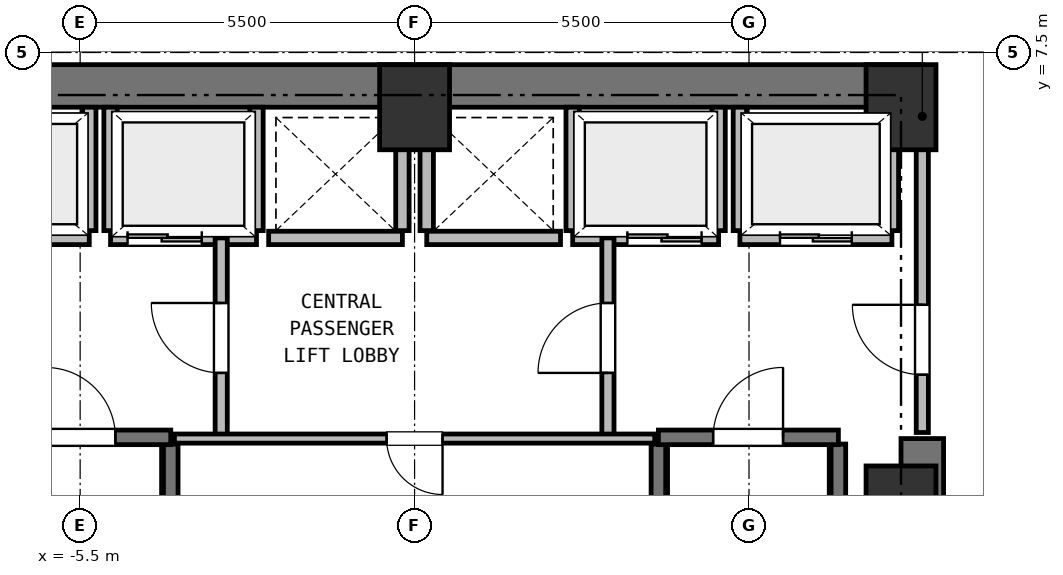
"""IFC4 building model, lengths in metres.
Left out: names, types, materials, properties, quantities, classifications, styles, units other than length and angle.
Written with IfcOpenShell. Run it as: python <this file> out.ifc"""

import sys

from ifc_helpers import new_model, si_unit, direction, frame, frame_2d, origin, origin_2d, place, context, subcontext, project, spatial, rectangle, extrude, element, fill, save


model = new_model("IFC4")
c1 = context("Model", 3, precision=1e-05, world=origin(), true_north=direction((0.0, 1.0)))
c2 = subcontext(c1, "Body", "Model", "MODEL_VIEW")
j1 = project(units=[si_unit("LENGTHUNIT", "METRE"), si_unit("PLANEANGLEUNIT", "RADIAN")], contexts=[c1])
p1 = place(None, origin())
s1 = spatial("IfcSite", under=j1, at=p1, CompositionType="ELEMENT")
p2 = place(p1, origin())
s2 = spatial("IfcBuilding", under=s1, at=p2, CompositionType="ELEMENT")
p3 = place(p2, frame((0.0, 0.0, 6.0)))
s3 = spatial("IfcBuildingStorey", under=s2, at=p3, CompositionType="ELEMENT", Elevation=6.0)
for number, where, z_axis, x_axis in (
    (1, (8.0, 0.0, 0.0), (0.0, 0.0, 1.0), (1.0, 0.0, 0.0)),
    (2, (8.0, 6.6, 0.0), (0.0, 0.0, 1.0), (1.0, 0.0, 0.0)),
    (3, (0.0, 6.6, 0.0), (0.0, 0.0, 1.0), (1.0, 0.0, 0.0)),
):
    element("IfcColumn", number, at=place(p3, frame(where, z_axis=z_axis, x_axis=x_axis)), inside=s3, PredefinedType="COLUMN", context=c2, shape_type="SweptSolid", body=[
        extrude(rectangle(XDim=1.15, YDim=1.4, at=origin_2d()), origin(), (0.0, 0.0, 1.0), 5.0),
    ])
p4 = place(p3, frame((-8.35, 6.95, 0.0), z_axis=(0.0, 0.0, 1.0), x_axis=(1.0, 0.0, 0.0)))
e4 = element("IfcWall", 4, at=p4, inside=s3, PredefinedType="SHEAR", context=c2, shape_type="SweptSolid", body=[
    extrude(rectangle(XDim=16.7, YDim=0.7, at=frame_2d((8.35, 0.0))), origin(), (0.0, 0.0, 1.0), 4.72),
])
p5 = place(p3, frame((8.35, -6.95, 0.0), z_axis=(0.0, 0.0, 1.0), x_axis=(0.0, 1.0, 0.0)))
e5 = element("IfcWall", 5, at=p5, inside=s3, PredefinedType="SHEAR", context=c2, shape_type="SweptSolid", body=[
    extrude(rectangle(XDim=8.1, YDim=0.7, at=frame_2d((4.05, 0.0))), origin(), (0.0, 0.0, 1.0), 4.72),
])
p6 = place(p3, frame((-4.01, -6.16, 0.0), z_axis=(0.0, 0.0, 1.0), x_axis=(0.0, 1.0, 0.0)))
e6 = element("IfcWall", 6, at=p6, inside=s3, PredefinedType="SHEAR", context=c2, shape_type="SweptSolid", body=[
    extrude(rectangle(XDim=7.22, YDim=0.24, at=frame_2d((3.61, 0.0))), origin(), (0.0, 0.0, 1.0), 4.72),
])
p7 = place(p3, frame((-6.97, 1.17, 0.0), z_axis=(0.0, 0.0, 1.0), x_axis=(1.0, 0.0, 0.0)))
e7 = element("IfcWall", 7, at=p7, inside=s3, PredefinedType="SHEAR", context=c2, shape_type="SweptSolid", body=[
    extrude(rectangle(XDim=2.96, YDim=0.24, at=frame_2d((1.48, 0.0))), origin(), (0.0, 0.0, 1.0), 4.72),
])
p8 = place(p7, frame((0.9, 0.0, 0.0)))
e8 = element("IfcOpeningElement", 8, at=p8, cuts=e7, PredefinedType="OPENING", context=c2, shape_type="SweptSolid", body=[
    extrude(rectangle(XDim=1.15, YDim=2.15, at=frame_2d((0.575, 1.075))), frame((0.0, 0.13, 0.0), z_axis=(0.0, -1.0, 0.0), x_axis=(1.0, 0.0, 0.0)), (0.0, 0.0, 1.0), 0.26),
])
for number, where, z_axis, x_axis in (
    (9, (4.01, -6.16, 0.0), (0.0, 0.0, 1.0), (0.0, 1.0, 0.0)),
    (10, (6.97, -6.16, 0.0), (0.0, 0.0, 1.0), (0.0, 1.0, 0.0)),
):
    element("IfcWall", number, at=place(p3, frame(where, z_axis=z_axis, x_axis=x_axis)), inside=s3, PredefinedType="SHEAR", context=c2, shape_type="SweptSolid", body=[
        extrude(rectangle(XDim=7.22, YDim=0.24, at=frame_2d((3.61, 0.0))), origin(), (0.0, 0.0, 1.0), 4.72),
    ])
p9 = place(p3, frame((4.01, 1.17, 0.0), z_axis=(0.0, 0.0, 1.0), x_axis=(1.0, 0.0, 0.0)))
e11 = element("IfcWall", 11, at=p9, inside=s3, PredefinedType="SHEAR", context=c2, shape_type="SweptSolid", body=[
    extrude(rectangle(XDim=2.96, YDim=0.24, at=frame_2d((1.48, 0.0))), origin(), (0.0, 0.0, 1.0), 4.72),
])
p10 = place(p9, frame((0.9, 0.0, 0.0)))
e12 = element("IfcOpeningElement", 12, at=p10, cuts=e11, PredefinedType="OPENING", context=c2, shape_type="SweptSolid", body=[
    extrude(rectangle(XDim=1.15, YDim=2.15, at=frame_2d((0.575, 1.075))), frame((0.0, 0.13, 0.0), z_axis=(0.0, -1.0, 0.0), x_axis=(1.0, 0.0, 0.0)), (0.0, 0.0, 1.0), 0.26),
])
p11 = place(p3, frame((-7.85, 4.45, 0.0), z_axis=(0.0, 0.0, 1.0), x_axis=(1.0, 0.0, 0.0)))
e13 = element("IfcWall", 13, at=p11, inside=s3, PredefinedType="PARTITIONING", context=c2, shape_type="SweptSolid", body=[
    extrude(rectangle(XDim=2.5, YDim=0.22, at=frame_2d((1.25, 0.0))), origin(), (0.0, 0.0, 1.0), 4.72),
])
p12 = place(p11, frame((0.66, 0.0, 0.0)))
e14 = element("IfcOpeningElement", 14, at=p12, cuts=e13, PredefinedType="OPENING", context=c2, shape_type="SweptSolid", body=[
    extrude(rectangle(XDim=1.18, YDim=2.15, at=frame_2d((0.59, 1.075))), frame((0.0, 0.12, 0.0), z_axis=(0.0, -1.0, 0.0), x_axis=(1.0, 0.0, 0.0)), (0.0, 0.0, 1.0), 0.24),
])
p13 = place(p3, frame((-5.35, 4.57, 0.0), z_axis=(0.0, 0.0, 1.0), x_axis=(0.0, 1.0, 0.0)))
e15 = element("IfcWall", 15, at=p13, inside=s3, PredefinedType="PARTITIONING", context=c2, shape_type="SweptSolid", body=[
    extrude(rectangle(XDim=2.03, YDim=0.22, at=frame_2d((1.015, 0.0))), origin(), (0.0, 0.0, 1.0), 4.72),
])
p14 = place(p3, frame((5.35, 4.45, 0.0), z_axis=(0.0, 0.0, 1.0), x_axis=(1.0, 0.0, 0.0)))
e16 = element("IfcWall", 16, at=p14, inside=s3, PredefinedType="PARTITIONING", context=c2, shape_type="SweptSolid", body=[
    extrude(rectangle(XDim=2.5, YDim=0.22, at=frame_2d((1.25, 0.0))), origin(), (0.0, 0.0, 1.0), 4.72),
])
p15 = place(p14, frame((0.66, 0.0, 0.0)))
e17 = element("IfcOpeningElement", 17, at=p15, cuts=e16, PredefinedType="OPENING", context=c2, shape_type="SweptSolid", body=[
    extrude(rectangle(XDim=1.18, YDim=2.15, at=frame_2d((0.59, 1.075))), frame((0.0, 0.12, 0.0), z_axis=(0.0, -1.0, 0.0), x_axis=(1.0, 0.0, 0.0)), (0.0, 0.0, 1.0), 0.24),
])
p16 = place(p3, frame((5.35, 4.57, 0.0), z_axis=(0.0, 0.0, 1.0), x_axis=(0.0, 1.0, 0.0)))
e18 = element("IfcWall", 18, at=p16, inside=s3, PredefinedType="PARTITIONING", context=c2, shape_type="SweptSolid", body=[
    extrude(rectangle(XDim=2.03, YDim=0.22, at=frame_2d((1.015, 0.0))), origin(), (0.0, 0.0, 1.0), 4.72),
])
p17 = place(p3, frame((7.85, 4.57, 0.0), z_axis=(0.0, 0.0, 1.0), x_axis=(0.0, 1.0, 0.0)))
e19 = element("IfcWall", 19, at=p17, inside=s3, PredefinedType="PARTITIONING", context=c2, shape_type="SweptSolid", body=[
    extrude(rectangle(XDim=2.03, YDim=0.22, at=frame_2d((1.015, 0.0))), origin(), (0.0, 0.0, 1.0), 4.3),
])
p18 = place(p3, frame((-5.0, 4.45, 0.0), z_axis=(0.0, 0.0, 1.0), x_axis=(1.0, 0.0, 0.0)))
e20 = element("IfcWall", 20, at=p18, inside=s3, PredefinedType="PARTITIONING", context=c2, shape_type="SweptSolid", body=[
    extrude(rectangle(XDim=2.4, YDim=0.22, at=frame_2d((1.2, 0.0))), origin(), (0.0, 0.0, 1.0), 4.72),
])
p19 = place(p18, frame((0.28, 0.0, 0.0)))
e21 = element("IfcOpeningElement", 21, at=p19, cuts=e20, PredefinedType="OPENING", context=c2, shape_type="SweptSolid", body=[
    extrude(rectangle(XDim=1.22, YDim=2.15, at=frame_2d((0.61, 1.075))), frame((0.0, 0.12, 0.0), z_axis=(0.0, -1.0, 0.0), x_axis=(1.0, 0.0, 0.0)), (0.0, 0.0, 1.0), 0.24),
])
for number, where, z_axis, x_axis in (
    (22, (-5.0, 4.57, 0.0), (0.0, 0.0, 1.0), (0.0, 1.0, 0.0)),
    (23, (-2.6, 4.57, 0.0), (0.0, 0.0, 1.0), (0.0, 1.0, 0.0)),
):
    element("IfcWall", number, at=place(p3, frame(where, z_axis=z_axis, x_axis=x_axis)), inside=s3, PredefinedType="PARTITIONING", context=c2, shape_type="SweptSolid", body=[
        extrude(rectangle(XDim=2.03, YDim=0.22, at=frame_2d((1.015, 0.0))), origin(), (0.0, 0.0, 1.0), 4.72),
    ])
p20 = place(p3, frame((2.6, 4.45, 0.0), z_axis=(0.0, 0.0, 1.0), x_axis=(1.0, 0.0, 0.0)))
e24 = element("IfcWall", 24, at=p20, inside=s3, PredefinedType="PARTITIONING", context=c2, shape_type="SweptSolid", body=[
    extrude(rectangle(XDim=2.4, YDim=0.22, at=frame_2d((1.2, 0.0))), origin(), (0.0, 0.0, 1.0), 4.72),
])
p21 = place(p20, frame((0.9, 0.0, 0.0)))
e25 = element("IfcOpeningElement", 25, at=p21, cuts=e24, PredefinedType="OPENING", context=c2, shape_type="SweptSolid", body=[
    extrude(rectangle(XDim=1.22, YDim=2.15, at=frame_2d((0.61, 1.075))), frame((0.0, 0.12, 0.0), z_axis=(0.0, -1.0, 0.0), x_axis=(1.0, 0.0, 0.0)), (0.0, 0.0, 1.0), 0.24),
])
for number, where, z_axis, x_axis in (
    (26, (2.6, 4.57, 0.0), (0.0, 0.0, 1.0), (0.0, 1.0, 0.0)),
    (27, (5.0, 4.57, 0.0), (0.0, 0.0, 1.0), (0.0, 1.0, 0.0)),
):
    element("IfcWall", number, at=place(p3, frame(where, z_axis=z_axis, x_axis=x_axis)), inside=s3, PredefinedType="PARTITIONING", context=c2, shape_type="SweptSolid", body=[
        extrude(rectangle(XDim=2.03, YDim=0.22, at=frame_2d((1.015, 0.0))), origin(), (0.0, 0.0, 1.0), 4.72),
    ])
p22 = place(p3, frame((-2.4, 4.45, 0.0), z_axis=(0.0, 0.0, 1.0), x_axis=(1.0, 0.0, 0.0)))
e28 = element("IfcWall", 28, at=p22, inside=s3, PredefinedType="PARTITIONING", context=c2, shape_type="SweptSolid", body=[
    extrude(rectangle(XDim=2.2, YDim=0.22, at=frame_2d((1.1, 0.0))), origin(), (0.0, 0.0, 1.0), 4.72),
])
p23 = place(p3, frame((-0.2, 4.57, 0.0), z_axis=(0.0, 0.0, 1.0), x_axis=(0.0, 1.0, 0.0)))
e29 = element("IfcWall", 29, at=p23, inside=s3, PredefinedType="PARTITIONING", context=c2, shape_type="SweptSolid", body=[
    extrude(rectangle(XDim=2.03, YDim=0.22, at=frame_2d((1.015, 0.0))), origin(), (0.0, 0.0, 1.0), 4.72),
])
p24 = place(p3, frame((0.2, 4.45, 0.0), z_axis=(0.0, 0.0, 1.0), x_axis=(1.0, 0.0, 0.0)))
e30 = element("IfcWall", 30, at=p24, inside=s3, PredefinedType="PARTITIONING", context=c2, shape_type="SweptSolid", body=[
    extrude(rectangle(XDim=2.2, YDim=0.22, at=frame_2d((1.1, 0.0))), origin(), (0.0, 0.0, 1.0), 4.72),
])
p25 = place(p3, frame((0.2, 4.57, 0.0), z_axis=(0.0, 0.0, 1.0), x_axis=(0.0, 1.0, 0.0)))
e31 = element("IfcWall", 31, at=p25, inside=s3, PredefinedType="PARTITIONING", context=c2, shape_type="SweptSolid", body=[
    extrude(rectangle(XDim=2.03, YDim=0.22, at=frame_2d((1.015, 0.0))), origin(), (0.0, 0.0, 1.0), 4.72),
])
p26 = place(p3, frame((-3.18, 1.15, 0.0), z_axis=(0.0, 0.0, 1.0), x_axis=(0.0, 1.0, 0.0)))
e32 = element("IfcWall", 32, at=p26, inside=s3, PredefinedType="PARTITIONING", context=c2, shape_type="SweptSolid", body=[
    extrude(rectangle(XDim=3.3, YDim=0.2, at=frame_2d((1.65, 0.0))), origin(), (0.0, 0.0, 1.0), 4.72),
])
p27 = place(p26, frame((1.08, 0.0, 0.0)))
e33 = element("IfcOpeningElement", 33, at=p27, cuts=e32, PredefinedType="OPENING", context=c2, shape_type="SweptSolid", body=[
    extrude(rectangle(XDim=1.15, YDim=2.15, at=frame_2d((0.575, 1.075))), frame((0.0, 0.11, 0.0), z_axis=(0.0, -1.0, 0.0), x_axis=(1.0, 0.0, 0.0)), (0.0, 0.0, 1.0), 0.22),
])
p28 = place(p3, frame((3.18, 1.15, 0.0), z_axis=(0.0, 0.0, 1.0), x_axis=(0.0, 1.0, 0.0)))
e34 = element("IfcWall", 34, at=p28, inside=s3, PredefinedType="PARTITIONING", context=c2, shape_type="SweptSolid", body=[
    extrude(rectangle(XDim=3.3, YDim=0.2, at=frame_2d((1.65, 0.0))), origin(), (0.0, 0.0, 1.0), 4.72),
])
p29 = place(p28, frame((1.08, 0.0, 0.0)))
e35 = element("IfcOpeningElement", 35, at=p29, cuts=e34, PredefinedType="OPENING", context=c2, shape_type="SweptSolid", body=[
    extrude(rectangle(XDim=1.15, YDim=2.15, at=frame_2d((0.575, 1.075))), frame((0.0, 0.11, 0.0), z_axis=(0.0, -1.0, 0.0), x_axis=(1.0, 0.0, 0.0)), (0.0, 0.0, 1.0), 0.22),
])
p30 = place(p3, frame((8.35, 1.25, 0.0), z_axis=(0.0, 0.0, 1.0), x_axis=(0.0, 1.0, 0.0)))
e36 = element("IfcWall", 36, at=p30, inside=s3, PredefinedType="PARTITIONING", context=c2, shape_type="SweptSolid", body=[
    extrude(rectangle(XDim=5.3, YDim=0.2, at=frame_2d((2.65, 0.0))), origin(), (0.0, 0.0, 1.0), 4.72),
])
p31 = place(p30, frame((0.95, 0.0, 0.0)))
e37 = element("IfcOpeningElement", 37, at=p31, cuts=e36, PredefinedType="OPENING", context=c2, shape_type="SweptSolid", body=[
    extrude(rectangle(XDim=1.15, YDim=2.15, at=frame_2d((0.575, 1.075))), frame((0.0, 0.11, 0.0), z_axis=(0.0, -1.0, 0.0), x_axis=(1.0, 0.0, 0.0)), (0.0, 0.0, 1.0), 0.22),
])
p32 = place(p3, frame((3.95, 1.15, 0.0), z_axis=(0.0, 0.0, 1.0), x_axis=(-1.0, 0.0, 0.0)))
e38 = element("IfcWall", 38, at=p32, inside=s3, PredefinedType="PARTITIONING", context=c2, shape_type="SweptSolid", body=[
    extrude(rectangle(XDim=7.9, YDim=0.15, at=frame_2d((3.95, 0.0))), origin(), (0.0, 0.0, 1.0), 4.72),
])
p33 = place(p32, frame((3.49, 0.0, 0.0)))
e39 = element("IfcOpeningElement", 39, at=p33, cuts=e38, PredefinedType="OPENING", context=c2, shape_type="SweptSolid", body=[
    extrude(rectangle(XDim=0.92, YDim=2.05, at=frame_2d((0.46, 1.025))), frame((0.0, 0.085, 0.0), z_axis=(0.0, -1.0, 0.0), x_axis=(1.0, 0.0, 0.0)), (0.0, 0.0, 1.0), 0.17),
])
p34 = place(p8, origin())
e40 = element("IfcDoor", 40, at=p34, inside=s3, OperationType="SINGLE_SWING_LEFT", PredefinedType="DOOR", context=c2, shape_type="SweptSolid", body=[
    extrude(rectangle(XDim=1.15, YDim=2.15, at=frame_2d((0.575, 1.075))), frame((0.0, 0.025, 0.0), z_axis=(0.0, -1.0, 0.0), x_axis=(1.0, 0.0, 0.0)), (0.0, 0.0, 1.0), 0.05),
])
fill(e8, e40)
p35 = place(p10, origin())
e41 = element("IfcDoor", 41, at=p35, inside=s3, OperationType="SINGLE_SWING_RIGHT", PredefinedType="DOOR", context=c2, shape_type="SweptSolid", body=[
    extrude(rectangle(XDim=1.15, YDim=2.15, at=frame_2d((0.575, 1.075))), frame((0.0, 0.025, 0.0), z_axis=(0.0, -1.0, 0.0), x_axis=(1.0, 0.0, 0.0)), (0.0, 0.0, 1.0), 0.05),
])
fill(e12, e41)
p36 = place(p15, origin())
e42 = element("IfcDoor", 42, at=p36, inside=s3, OperationType="DOUBLE_DOOR_SLIDING", PredefinedType="DOOR", context=c2, shape_type="SweptSolid", body=[
    extrude(rectangle(XDim=1.18, YDim=2.15, at=frame_2d((0.59, 1.075))), frame((0.0, 0.025, 0.0), z_axis=(0.0, -1.0, 0.0), x_axis=(1.0, 0.0, 0.0)), (0.0, 0.0, 1.0), 0.05),
])
fill(e17, e42)
p37 = place(p19, origin())
e43 = element("IfcDoor", 43, at=p37, inside=s3, OperationType="DOUBLE_DOOR_SLIDING", PredefinedType="DOOR", context=c2, shape_type="SweptSolid", body=[
    extrude(rectangle(XDim=1.22, YDim=2.15, at=frame_2d((0.61, 1.075))), frame((0.0, 0.025, 0.0), z_axis=(0.0, -1.0, 0.0), x_axis=(1.0, 0.0, 0.0)), (0.0, 0.0, 1.0), 0.05),
])
fill(e21, e43)
p38 = place(p21, origin())
e44 = element("IfcDoor", 44, at=p38, inside=s3, OperationType="DOUBLE_DOOR_SLIDING", PredefinedType="DOOR", context=c2, shape_type="SweptSolid", body=[
    extrude(rectangle(XDim=1.22, YDim=2.15, at=frame_2d((0.61, 1.075))), frame((0.0, 0.025, 0.0), z_axis=(0.0, -1.0, 0.0), x_axis=(1.0, 0.0, 0.0)), (0.0, 0.0, 1.0), 0.05),
])
fill(e25, e44)
p39 = place(p27, origin())
e45 = element("IfcDoor", 45, at=p39, inside=s3, OperationType="SINGLE_SWING_RIGHT", PredefinedType="DOOR", context=c2, shape_type="SweptSolid", body=[
    extrude(rectangle(XDim=1.15, YDim=2.15, at=frame_2d((0.575, 1.075))), frame((0.0, 0.025, 0.0), z_axis=(0.0, -1.0, 0.0), x_axis=(1.0, 0.0, 0.0)), (0.0, 0.0, 1.0), 0.05),
])
fill(e33, e45)
p40 = place(p29, origin())
e46 = element("IfcDoor", 46, at=p40, inside=s3, OperationType="SINGLE_SWING_LEFT", PredefinedType="DOOR", context=c2, shape_type="SweptSolid", body=[
    extrude(rectangle(XDim=1.15, YDim=2.15, at=frame_2d((0.575, 1.075))), frame((0.0, 0.025, 0.0), z_axis=(0.0, -1.0, 0.0), x_axis=(1.0, 0.0, 0.0)), (0.0, 0.0, 1.0), 0.05),
])
fill(e35, e46)
p41 = place(p31, origin())
e47 = element("IfcDoor", 47, at=p41, inside=s3, OperationType="SINGLE_SWING_RIGHT", PredefinedType="DOOR", context=c2, shape_type="SweptSolid", body=[
    extrude(rectangle(XDim=1.15, YDim=2.15, at=frame_2d((0.575, 1.075))), frame((0.0, 0.025, 0.0), z_axis=(0.0, -1.0, 0.0), x_axis=(1.0, 0.0, 0.0)), (0.0, 0.0, 1.0), 0.05),
])
fill(e37, e47)
p42 = place(p33, origin())
e48 = element("IfcDoor", 48, at=p42, inside=s3, OperationType="SINGLE_SWING_LEFT", PredefinedType="DOOR", context=c2, shape_type="SweptSolid", body=[
    extrude(rectangle(XDim=0.92, YDim=2.05, at=frame_2d((0.46, 1.025))), frame((0.0, 0.025, 0.0), z_axis=(0.0, -1.0, 0.0), x_axis=(1.0, 0.0, 0.0)), (0.0, 0.0, 1.0), 0.05),
])
fill(e39, e48)
save(model, sys.argv[1])
